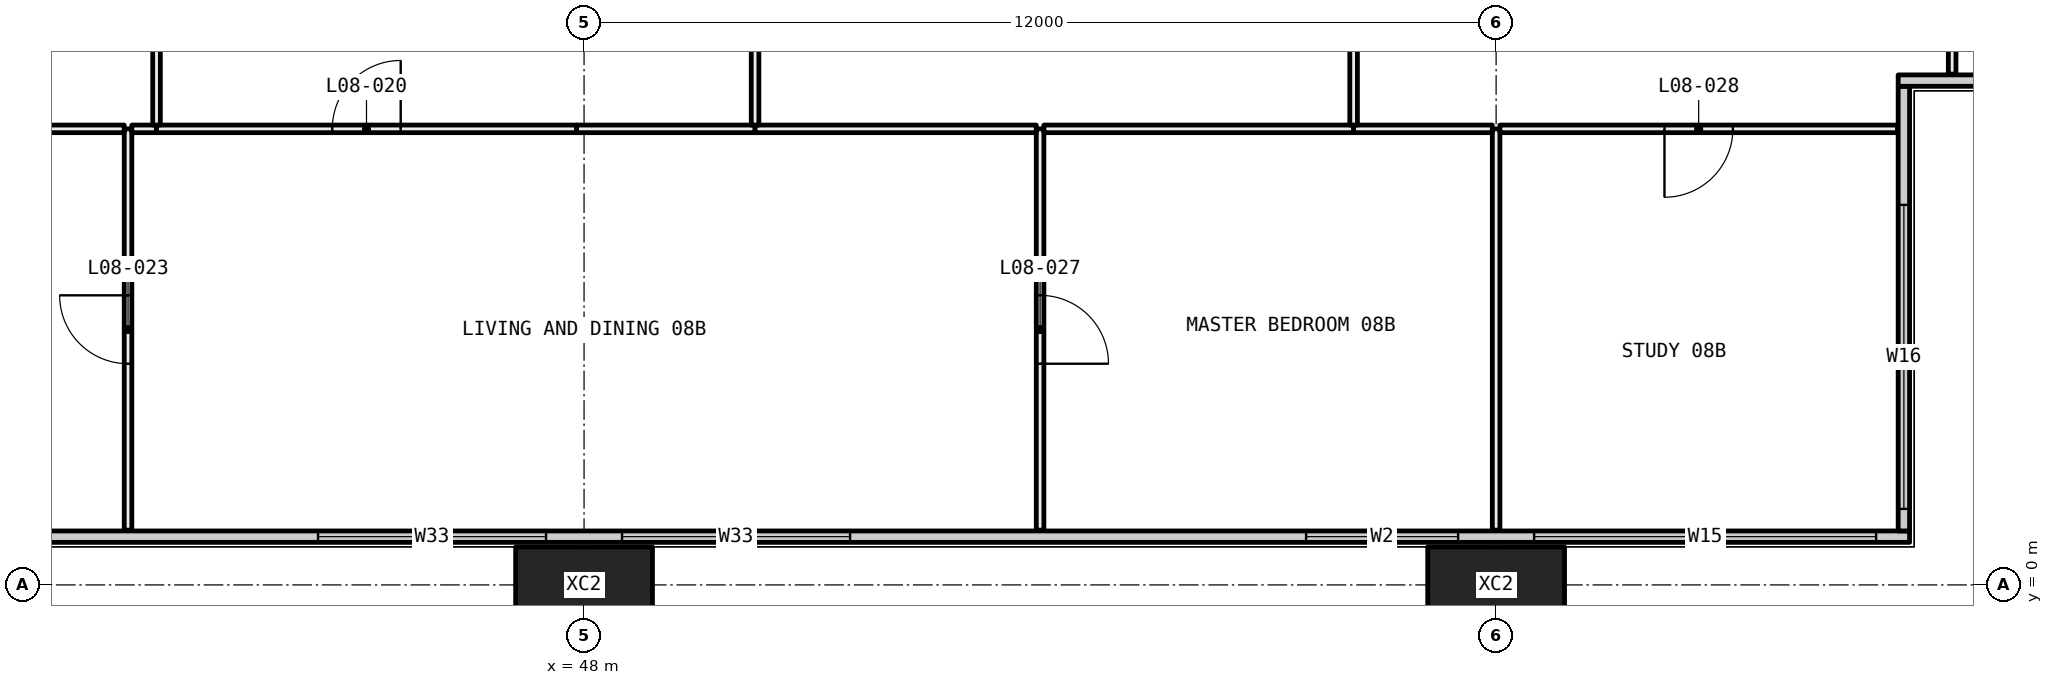
"""IFC4 building model, lengths in metres.
Left out: names, types, materials, properties, quantities, classifications, styles, units other than length and angle.
Written with IfcOpenShell. Run it as: python <this file> out.ifc"""

import sys

from ifc_helpers import new_model, si_unit, direction, frame, frame_2d, origin, origin_2d, place, context, subcontext, project, spatial, rectangle, hollow_rectangle, extrude, element, fill, save


model = new_model("IFC4")
c1 = context("Model", 3, precision=1e-05, world=origin(), true_north=direction((0.0, 1.0)))
c2 = subcontext(c1, "Body", "Model", "MODEL_VIEW")
j1 = project(units=[si_unit("LENGTHUNIT", "METRE"), si_unit("PLANEANGLEUNIT", "RADIAN")], contexts=[c1])
p1 = place(None, origin())
s1 = spatial("IfcSite", under=j1, at=p1, CompositionType="ELEMENT")
p2 = place(p1, origin())
s2 = spatial("IfcBuilding", under=s1, at=p2, CompositionType="ELEMENT")
p3 = place(p2, frame((0.0, 0.0, 40.35)))
s3 = spatial("IfcBuildingStorey", under=s2, at=p3, CompositionType="ELEMENT", Elevation=40.35)
for number, where, z_axis, x_axis in (
    (1, (48.0, 0.0, -0.4), (0.0, 0.0, 1.0), (1.0, 0.0, 0.0)),
    (2, (60.0, 0.0, -0.4), (0.0, 0.0, 1.0), (1.0, 0.0, 0.0)),
):
    element("IfcColumn", number, at=place(p3, frame(where, z_axis=z_axis, x_axis=x_axis)), inside=s3, PredefinedType="COLUMN", context=c2, shape_type="SweptSolid", body=[
        extrude(hollow_rectangle(XDim=1.8, YDim=1.0, WallThickness=0.07, at=origin_2d()), origin(), (0.0, 0.0, 1.0), 3.45),
    ])
p4 = place(p3, frame((6.56, 0.635, 0.0), z_axis=(0.0, 0.0, 1.0), x_axis=(1.0, 0.0, 0.0)))
e3 = element("IfcWall", 3, at=p4, inside=s3, PredefinedType="ELEMENTEDWALL", context=c2, shape_type="SweptSolid", body=[
    extrude(rectangle(XDim=58.88, YDim=0.15, at=frame_2d((29.44, 0.0))), origin(), (0.0, 0.0, 1.0), 3.05),
])
p5 = place(p4, frame((0.44, 0.0, 0.45)))
e4 = element("IfcOpeningElement", 4, at=p5, cuts=e3, PredefinedType="OPENING", context=c2, shape_type="SweptSolid", body=[
    extrude(rectangle(XDim=4.5, YDim=2.55, at=frame_2d((2.25, 1.275))), frame((0.0, 0.085, 0.0), z_axis=(0.0, -1.0, 0.0), x_axis=(1.0, 0.0, 0.0)), (0.0, 0.0, 1.0), 0.17),
])
p6 = place(p4, frame((5.94, 0.0, 0.45)))
e5 = element("IfcOpeningElement", 5, at=p6, cuts=e3, PredefinedType="OPENING", context=c2, shape_type="SweptSolid", body=[
    extrude(rectangle(XDim=3.0, YDim=2.55, at=frame_2d((1.5, 1.275))), frame((0.0, 0.085, 0.0), z_axis=(0.0, -1.0, 0.0), x_axis=(1.0, 0.0, 0.0)), (0.0, 0.0, 1.0), 0.17),
])
p7 = place(p4, frame((13.94, 0.0, 0.45)))
e6 = element("IfcOpeningElement", 6, at=p7, cuts=e3, PredefinedType="OPENING", context=c2, shape_type="SweptSolid", body=[
    extrude(rectangle(XDim=3.0, YDim=2.55, at=frame_2d((1.5, 1.275))), frame((0.0, 0.085, 0.0), z_axis=(0.0, -1.0, 0.0), x_axis=(1.0, 0.0, 0.0)), (0.0, 0.0, 1.0), 0.17),
])
p8 = place(p4, frame((17.94, 0.0, 0.45)))
e7 = element("IfcOpeningElement", 7, at=p8, cuts=e3, PredefinedType="OPENING", context=c2, shape_type="SweptSolid", body=[
    extrude(rectangle(XDim=3.0, YDim=2.55, at=frame_2d((1.5, 1.275))), frame((0.0, 0.085, 0.0), z_axis=(0.0, -1.0, 0.0), x_axis=(1.0, 0.0, 0.0)), (0.0, 0.0, 1.0), 0.17),
])
p9 = place(p4, frame((26.94, 0.0, 0.45)))
e8 = element("IfcOpeningElement", 8, at=p9, cuts=e3, PredefinedType="OPENING", context=c2, shape_type="SweptSolid", body=[
    extrude(rectangle(XDim=2.0, YDim=2.55, at=frame_2d((1.0, 1.275))), frame((0.0, 0.085, 0.0), z_axis=(0.0, -1.0, 0.0), x_axis=(1.0, 0.0, 0.0)), (0.0, 0.0, 1.0), 0.17),
])
p10 = place(p4, frame((29.94, 0.0, 0.45)))
e9 = element("IfcOpeningElement", 9, at=p10, cuts=e3, PredefinedType="OPENING", context=c2, shape_type="SweptSolid", body=[
    extrude(rectangle(XDim=3.0, YDim=2.55, at=frame_2d((1.5, 1.275))), frame((0.0, 0.085, 0.0), z_axis=(0.0, -1.0, 0.0), x_axis=(1.0, 0.0, 0.0)), (0.0, 0.0, 1.0), 0.17),
])
p11 = place(p4, frame((37.94, 0.0, 0.45)))
e10 = element("IfcOpeningElement", 10, at=p11, cuts=e3, PredefinedType="OPENING", context=c2, shape_type="SweptSolid", body=[
    extrude(rectangle(XDim=3.0, YDim=2.55, at=frame_2d((1.5, 1.275))), frame((0.0, 0.085, 0.0), z_axis=(0.0, -1.0, 0.0), x_axis=(1.0, 0.0, 0.0)), (0.0, 0.0, 1.0), 0.17),
])
p12 = place(p4, frame((41.94, 0.0, 0.45)))
e11 = element("IfcOpeningElement", 11, at=p12, cuts=e3, PredefinedType="OPENING", context=c2, shape_type="SweptSolid", body=[
    extrude(rectangle(XDim=3.0, YDim=2.55, at=frame_2d((1.5, 1.275))), frame((0.0, 0.085, 0.0), z_axis=(0.0, -1.0, 0.0), x_axis=(1.0, 0.0, 0.0)), (0.0, 0.0, 1.0), 0.17),
])
p13 = place(p4, frame((50.94, 0.0, 0.45)))
e12 = element("IfcOpeningElement", 12, at=p13, cuts=e3, PredefinedType="OPENING", context=c2, shape_type="SweptSolid", body=[
    extrude(rectangle(XDim=2.0, YDim=2.55, at=frame_2d((1.0, 1.275))), frame((0.0, 0.085, 0.0), z_axis=(0.0, -1.0, 0.0), x_axis=(1.0, 0.0, 0.0)), (0.0, 0.0, 1.0), 0.17),
])
p14 = place(p4, frame((53.94, 0.0, 0.45)))
e13 = element("IfcOpeningElement", 13, at=p14, cuts=e3, PredefinedType="OPENING", context=c2, shape_type="SweptSolid", body=[
    extrude(rectangle(XDim=4.5, YDim=2.55, at=frame_2d((2.25, 1.275))), frame((0.0, 0.085, 0.0), z_axis=(0.0, -1.0, 0.0), x_axis=(1.0, 0.0, 0.0)), (0.0, 0.0, 1.0), 0.17),
])
p15 = place(p3, frame((65.365, 0.71, 0.0), z_axis=(0.0, 0.0, 1.0), x_axis=(0.0, 1.0, 0.0)))
e14 = element("IfcWall", 14, at=p15, inside=s3, PredefinedType="ELEMENTEDWALL", context=c2, shape_type="SweptSolid", body=[
    extrude(rectangle(XDim=5.85, YDim=0.15, at=frame_2d((2.925, 0.0))), origin(), (0.0, 0.0, 1.0), 3.05),
])
p16 = place(p15, frame((0.29, 0.0, 0.45)))
e15 = element("IfcOpeningElement", 15, at=p16, cuts=e14, PredefinedType="OPENING", context=c2, shape_type="SweptSolid", body=[
    extrude(rectangle(XDim=4.0, YDim=2.55, at=frame_2d((2.0, 1.275))), frame((0.0, 0.085, 0.0), z_axis=(0.0, -1.0, 0.0), x_axis=(1.0, 0.0, 0.0)), (0.0, 0.0, 1.0), 0.17),
])
p17 = place(p3, frame((65.29, 6.635, 0.0), z_axis=(0.0, 0.0, 1.0), x_axis=(1.0, 0.0, 0.0)))
e16 = element("IfcWall", 16, at=p17, inside=s3, PredefinedType="ELEMENTEDWALL", context=c2, shape_type="SweptSolid", body=[
    extrude(rectangle(XDim=6.15, YDim=0.15, at=frame_2d((3.075, 0.0))), origin(), (0.0, 0.0, 1.0), 3.05),
])
p18 = place(p17, frame((1.71, 0.0, 0.45)))
e17 = element("IfcOpeningElement", 17, at=p18, cuts=e16, PredefinedType="OPENING", context=c2, shape_type="SweptSolid", body=[
    extrude(rectangle(XDim=4.0, YDim=2.55, at=frame_2d((2.0, 1.275))), frame((0.0, 0.085, 0.0), z_axis=(0.0, -1.0, 0.0), x_axis=(1.0, 0.0, 0.0)), (0.0, 0.0, 1.0), 0.17),
])
p19 = place(p3, frame((42.0, 0.72, 0.0), z_axis=(0.0, 0.0, 1.0), x_axis=(0.0, 1.0, 0.0)))
e18 = element("IfcWall", 18, at=p19, inside=s3, PredefinedType="PARTITIONING", context=c2, shape_type="SweptSolid", body=[
    extrude(rectangle(XDim=5.28, YDim=0.1, at=frame_2d((2.64, 0.0))), origin(), (0.0, 0.0, 1.0), 3.05),
])
p20 = place(p19, frame((2.19, 0.0, 0.0)))
e19 = element("IfcOpeningElement", 19, at=p20, cuts=e18, PredefinedType="OPENING", context=c2, shape_type="SweptSolid", body=[
    extrude(rectangle(XDim=0.9, YDim=2.1, at=frame_2d((0.45, 1.05))), frame((0.0, 0.06, 0.0), z_axis=(0.0, -1.0, 0.0), x_axis=(1.0, 0.0, 0.0)), (0.0, 0.0, 1.0), 0.12),
])
p21 = place(p3, frame((41.95, 6.0, 0.0), z_axis=(0.0, 0.0, 1.0), x_axis=(-1.0, 0.0, 0.0)))
e20 = element("IfcWall", 20, at=p21, inside=s3, PredefinedType="PARTITIONING", context=c2, shape_type="SweptSolid", body=[
    extrude(rectangle(XDim=5.9, YDim=0.1, at=frame_2d((2.95, 0.0))), origin(), (0.0, 0.0, 1.0), 2.45),
])
p22 = place(p3, frame((54.0, 0.72, 0.0), z_axis=(0.0, 0.0, 1.0), x_axis=(0.0, 1.0, 0.0)))
e21 = element("IfcWall", 21, at=p22, inside=s3, PredefinedType="PARTITIONING", context=c2, shape_type="SweptSolid", body=[
    extrude(rectangle(XDim=5.28, YDim=0.1, at=frame_2d((2.64, 0.0))), origin(), (0.0, 0.0, 1.0), 3.05),
])
p23 = place(p22, frame((2.19, 0.0, 0.0)))
e22 = element("IfcOpeningElement", 22, at=p23, cuts=e21, PredefinedType="OPENING", context=c2, shape_type="SweptSolid", body=[
    extrude(rectangle(XDim=0.9, YDim=2.1, at=frame_2d((0.45, 1.05))), frame((0.0, 0.06, 0.0), z_axis=(0.0, -1.0, 0.0), x_axis=(1.0, 0.0, 0.0)), (0.0, 0.0, 1.0), 0.12),
])
p24 = place(p3, frame((42.375, 6.0, 0.0), z_axis=(0.0, 0.0, 1.0), x_axis=(-1.0, 0.0, 0.0)))
e23 = element("IfcWall", 23, at=p24, inside=s3, PredefinedType="PARTITIONING", context=c2, shape_type="SweptSolid", body=[
    extrude(rectangle(XDim=0.325, YDim=0.1, at=frame_2d((0.163, 0.0))), origin(), (0.0, 0.0, 1.0), 3.05),
])
p25 = place(p3, frame((50.25, 6.0, 0.0), z_axis=(0.0, 0.0, 1.0), x_axis=(-1.0, 0.0, 0.0)))
e24 = element("IfcWall", 24, at=p25, inside=s3, PredefinedType="PARTITIONING", context=c2, shape_type="SweptSolid", body=[
    extrude(rectangle(XDim=2.35, YDim=0.1, at=frame_2d((1.175, 0.0))), origin(), (0.0, 0.0, 1.0), 2.45),
])
p26 = place(p3, frame((47.9, 6.0, 0.0), z_axis=(0.0, 0.0, 1.0), x_axis=(-1.0, 0.0, 0.0)))
e25 = element("IfcWall", 25, at=p26, inside=s3, PredefinedType="PARTITIONING", context=c2, shape_type="SweptSolid", body=[
    extrude(rectangle(XDim=5.525, YDim=0.1, at=frame_2d((2.762, 0.0))), origin(), (0.0, 0.0, 1.0), 3.05),
])
p27 = place(p26, frame((2.312, 0.0, 0.0)))
e26 = element("IfcOpeningElement", 26, at=p27, cuts=e25, PredefinedType="OPENING", context=c2, shape_type="SweptSolid", body=[
    extrude(rectangle(XDim=0.9, YDim=2.1, at=frame_2d((0.45, 1.05))), frame((0.0, 0.06, 0.0), z_axis=(0.0, -1.0, 0.0), x_axis=(1.0, 0.0, 0.0)), (0.0, 0.0, 1.0), 0.12),
])
p28 = place(p3, frame((53.95, 6.0, 0.0), z_axis=(0.0, 0.0, 1.0), x_axis=(-1.0, 0.0, 0.0)))
e27 = element("IfcWall", 27, at=p28, inside=s3, PredefinedType="PARTITIONING", context=c2, shape_type="SweptSolid", body=[
    extrude(rectangle(XDim=3.7, YDim=0.1, at=frame_2d((1.85, 0.0))), origin(), (0.0, 0.0, 1.0), 3.05),
])
p29 = place(p3, frame((60.0, 0.72, 0.0), z_axis=(0.0, 0.0, 1.0), x_axis=(0.0, 1.0, 0.0)))
e28 = element("IfcWall", 28, at=p29, inside=s3, PredefinedType="PARTITIONING", context=c2, shape_type="SweptSolid", body=[
    extrude(rectangle(XDim=5.28, YDim=0.1, at=frame_2d((2.64, 0.0))), origin(), (0.0, 0.0, 1.0), 2.45),
])
p30 = place(p3, frame((58.125, 6.0, 0.0), z_axis=(0.0, 0.0, 1.0), x_axis=(-1.0, 0.0, 0.0)))
e29 = element("IfcWall", 29, at=p30, inside=s3, PredefinedType="PARTITIONING", context=c2, shape_type="SweptSolid", body=[
    extrude(rectangle(XDim=4.075, YDim=0.1, at=frame_2d((2.038, 0.0))), origin(), (0.0, 0.0, 1.0), 3.05),
])
p31 = place(p3, frame((59.95, 6.0, 0.0), z_axis=(0.0, 0.0, 1.0), x_axis=(-1.0, 0.0, 0.0)))
e30 = element("IfcWall", 30, at=p31, inside=s3, PredefinedType="PARTITIONING", context=c2, shape_type="SweptSolid", body=[
    extrude(rectangle(XDim=1.825, YDim=0.1, at=frame_2d((0.913, 0.0))), origin(), (0.0, 0.0, 1.0), 2.45),
])
p32 = place(p3, frame((65.28, 6.0, 0.0), z_axis=(0.0, 0.0, 1.0), x_axis=(-1.0, 0.0, 0.0)))
e31 = element("IfcWall", 31, at=p32, inside=s3, PredefinedType="PARTITIONING", context=c2, shape_type="SweptSolid", body=[
    extrude(rectangle(XDim=5.23, YDim=0.1, at=frame_2d((2.615, 0.0))), origin(), (0.0, 0.0, 1.0), 2.45),
])
p33 = place(p32, frame((2.165, 0.0, 0.0)))
e32 = element("IfcOpeningElement", 32, at=p33, cuts=e31, PredefinedType="OPENING", context=c2, shape_type="SweptSolid", body=[
    extrude(rectangle(XDim=0.9, YDim=2.1, at=frame_2d((0.45, 1.05))), frame((0.0, 0.06, 0.0), z_axis=(0.0, -1.0, 0.0), x_axis=(1.0, 0.0, 0.0)), (0.0, 0.0, 1.0), 0.12),
])
p34 = place(p3, frame((42.375, 6.05, 0.0), z_axis=(0.0, 0.0, 1.0), x_axis=(0.0, 1.0, 0.0)))
e33 = element("IfcWall", 33, at=p34, inside=s3, PredefinedType="PARTITIONING", context=c2, shape_type="SweptSolid", body=[
    extrude(rectangle(XDim=5.95, YDim=0.1, at=frame_2d((2.975, 0.0))), origin(), (0.0, 0.0, 1.0), 2.45),
])
p35 = place(p34, frame((2.525, 0.0, 0.0)))
e34 = element("IfcOpeningElement", 34, at=p35, cuts=e33, PredefinedType="OPENING", context=c2, shape_type="SweptSolid", body=[
    extrude(rectangle(XDim=0.9, YDim=2.1, at=frame_2d((0.45, 1.05))), frame((0.0, 0.06, 0.0), z_axis=(0.0, -1.0, 0.0), x_axis=(1.0, 0.0, 0.0)), (0.0, 0.0, 1.0), 0.12),
])
p36 = place(p3, frame((50.25, 6.05, 0.0), z_axis=(0.0, 0.0, 1.0), x_axis=(0.0, 1.0, 0.0)))
e35 = element("IfcWall", 35, at=p36, inside=s3, PredefinedType="PARTITIONING", context=c2, shape_type="SweptSolid", body=[
    extrude(rectangle(XDim=5.95, YDim=0.1, at=frame_2d((2.975, 0.0))), origin(), (0.0, 0.0, 1.0), 2.45),
])
p37 = place(p3, frame((58.125, 6.05, 0.0), z_axis=(0.0, 0.0, 1.0), x_axis=(0.0, 1.0, 0.0)))
e36 = element("IfcWall", 36, at=p37, inside=s3, PredefinedType="PARTITIONING", context=c2, shape_type="SweptSolid", body=[
    extrude(rectangle(XDim=5.95, YDim=0.1, at=frame_2d((2.975, 0.0))), origin(), (0.0, 0.0, 1.0), 2.45),
])
p38 = place(p37, frame((2.525, 0.0, 0.0)))
e37 = element("IfcOpeningElement", 37, at=p38, cuts=e36, PredefinedType="OPENING", context=c2, shape_type="SweptSolid", body=[
    extrude(rectangle(XDim=0.9, YDim=2.1, at=frame_2d((0.45, 1.05))), frame((0.0, 0.06, 0.0), z_axis=(0.0, -1.0, 0.0), x_axis=(1.0, 0.0, 0.0)), (0.0, 0.0, 1.0), 0.12),
])
p39 = place(p3, frame((66.0, 6.72, 0.0), z_axis=(0.0, 0.0, 1.0), x_axis=(0.0, 1.0, 0.0)))
e38 = element("IfcWall", 38, at=p39, inside=s3, PredefinedType="PARTITIONING", context=c2, shape_type="SweptSolid", body=[
    extrude(rectangle(XDim=5.28, YDim=0.1, at=frame_2d((2.64, 0.0))), origin(), (0.0, 0.0, 1.0), 2.45),
])
p40 = place(p39, frame((2.19, 0.0, 0.0)))
e39 = element("IfcOpeningElement", 39, at=p40, cuts=e38, PredefinedType="OPENING", context=c2, shape_type="SweptSolid", body=[
    extrude(rectangle(XDim=0.9, YDim=2.1, at=frame_2d((0.45, 1.05))), frame((0.0, 0.06, 0.0), z_axis=(0.0, -1.0, 0.0), x_axis=(1.0, 0.0, 0.0)), (0.0, 0.0, 1.0), 0.12),
])
p41 = place(p11, origin())
e40 = element("IfcWindow", 40, at=p41, inside=s3, PartitioningType="SINGLE_PANEL", PredefinedType="WINDOW", context=c2, shape_type="SweptSolid", body=[
    extrude(rectangle(XDim=3.0, YDim=2.55, at=frame_2d((1.5, 1.275))), frame((0.0, 0.03, 0.0), z_axis=(0.0, -1.0, 0.0), x_axis=(1.0, 0.0, 0.0)), (0.0, 0.0, 1.0), 0.06),
])
fill(e10, e40)
p42 = place(p12, origin())
e41 = element("IfcWindow", 41, at=p42, inside=s3, PartitioningType="SINGLE_PANEL", PredefinedType="WINDOW", context=c2, shape_type="SweptSolid", body=[
    extrude(rectangle(XDim=3.0, YDim=2.55, at=frame_2d((1.5, 1.275))), frame((0.0, 0.03, 0.0), z_axis=(0.0, -1.0, 0.0), x_axis=(1.0, 0.0, 0.0)), (0.0, 0.0, 1.0), 0.06),
])
fill(e11, e41)
p43 = place(p13, origin())
e42 = element("IfcWindow", 42, at=p43, inside=s3, PartitioningType="SINGLE_PANEL", PredefinedType="WINDOW", context=c2, shape_type="SweptSolid", body=[
    extrude(rectangle(XDim=2.0, YDim=2.55, at=frame_2d((1.0, 1.275))), frame((0.0, 0.03, 0.0), z_axis=(0.0, -1.0, 0.0), x_axis=(1.0, 0.0, 0.0)), (0.0, 0.0, 1.0), 0.06),
])
fill(e12, e42)
p44 = place(p14, origin())
e43 = element("IfcWindow", 43, at=p44, inside=s3, PartitioningType="SINGLE_PANEL", PredefinedType="WINDOW", context=c2, shape_type="SweptSolid", body=[
    extrude(rectangle(XDim=4.5, YDim=2.55, at=frame_2d((2.25, 1.275))), frame((0.0, 0.03, 0.0), z_axis=(0.0, -1.0, 0.0), x_axis=(1.0, 0.0, 0.0)), (0.0, 0.0, 1.0), 0.06),
])
fill(e13, e43)
p45 = place(p16, origin())
e44 = element("IfcWindow", 44, at=p45, inside=s3, PartitioningType="SINGLE_PANEL", PredefinedType="WINDOW", context=c2, shape_type="SweptSolid", body=[
    extrude(rectangle(XDim=4.0, YDim=2.55, at=frame_2d((2.0, 1.275))), frame((0.0, 0.03, 0.0), z_axis=(0.0, -1.0, 0.0), x_axis=(1.0, 0.0, 0.0)), (0.0, 0.0, 1.0), 0.06),
])
fill(e15, e44)
p46 = place(p27, frame((0.9, 0.0, 0.0), x_axis=(-1.0, 0.0, 0.0)))
e45 = element("IfcDoor", 45, at=p46, inside=s3, OperationType="SINGLE_SWING_LEFT", PredefinedType="DOOR", context=c2, shape_type="SweptSolid", body=[
    extrude(rectangle(XDim=0.9, YDim=2.1, at=frame_2d((0.45, 1.05))), frame((0.0, 0.025, 0.0), z_axis=(0.0, -1.0, 0.0), x_axis=(1.0, 0.0, 0.0)), (0.0, 0.0, 1.0), 0.05),
])
fill(e26, e45)
p47 = place(p20, origin())
e46 = element("IfcDoor", 46, at=p47, inside=s3, OperationType="SINGLE_SWING_LEFT", PredefinedType="DOOR", context=c2, shape_type="SweptSolid", body=[
    extrude(rectangle(XDim=0.9, YDim=2.1, at=frame_2d((0.45, 1.05))), frame((0.0, 0.025, 0.0), z_axis=(0.0, -1.0, 0.0), x_axis=(1.0, 0.0, 0.0)), (0.0, 0.0, 1.0), 0.05),
])
fill(e19, e46)
p48 = place(p23, frame((0.9, 0.0, 0.0), x_axis=(-1.0, 0.0, 0.0)))
e47 = element("IfcDoor", 47, at=p48, inside=s3, OperationType="SINGLE_SWING_LEFT", PredefinedType="DOOR", context=c2, shape_type="SweptSolid", body=[
    extrude(rectangle(XDim=0.9, YDim=2.1, at=frame_2d((0.45, 1.05))), frame((0.0, 0.025, 0.0), z_axis=(0.0, -1.0, 0.0), x_axis=(1.0, 0.0, 0.0)), (0.0, 0.0, 1.0), 0.05),
])
fill(e22, e47)
p49 = place(p33, origin())
e48 = element("IfcDoor", 48, at=p49, inside=s3, OperationType="SINGLE_SWING_LEFT", PredefinedType="DOOR", context=c2, shape_type="SweptSolid", body=[
    extrude(rectangle(XDim=0.9, YDim=2.1, at=frame_2d((0.45, 1.05))), frame((0.0, 0.025, 0.0), z_axis=(0.0, -1.0, 0.0), x_axis=(1.0, 0.0, 0.0)), (0.0, 0.0, 1.0), 0.05),
])
fill(e32, e48)
save(model, sys.argv[1])
